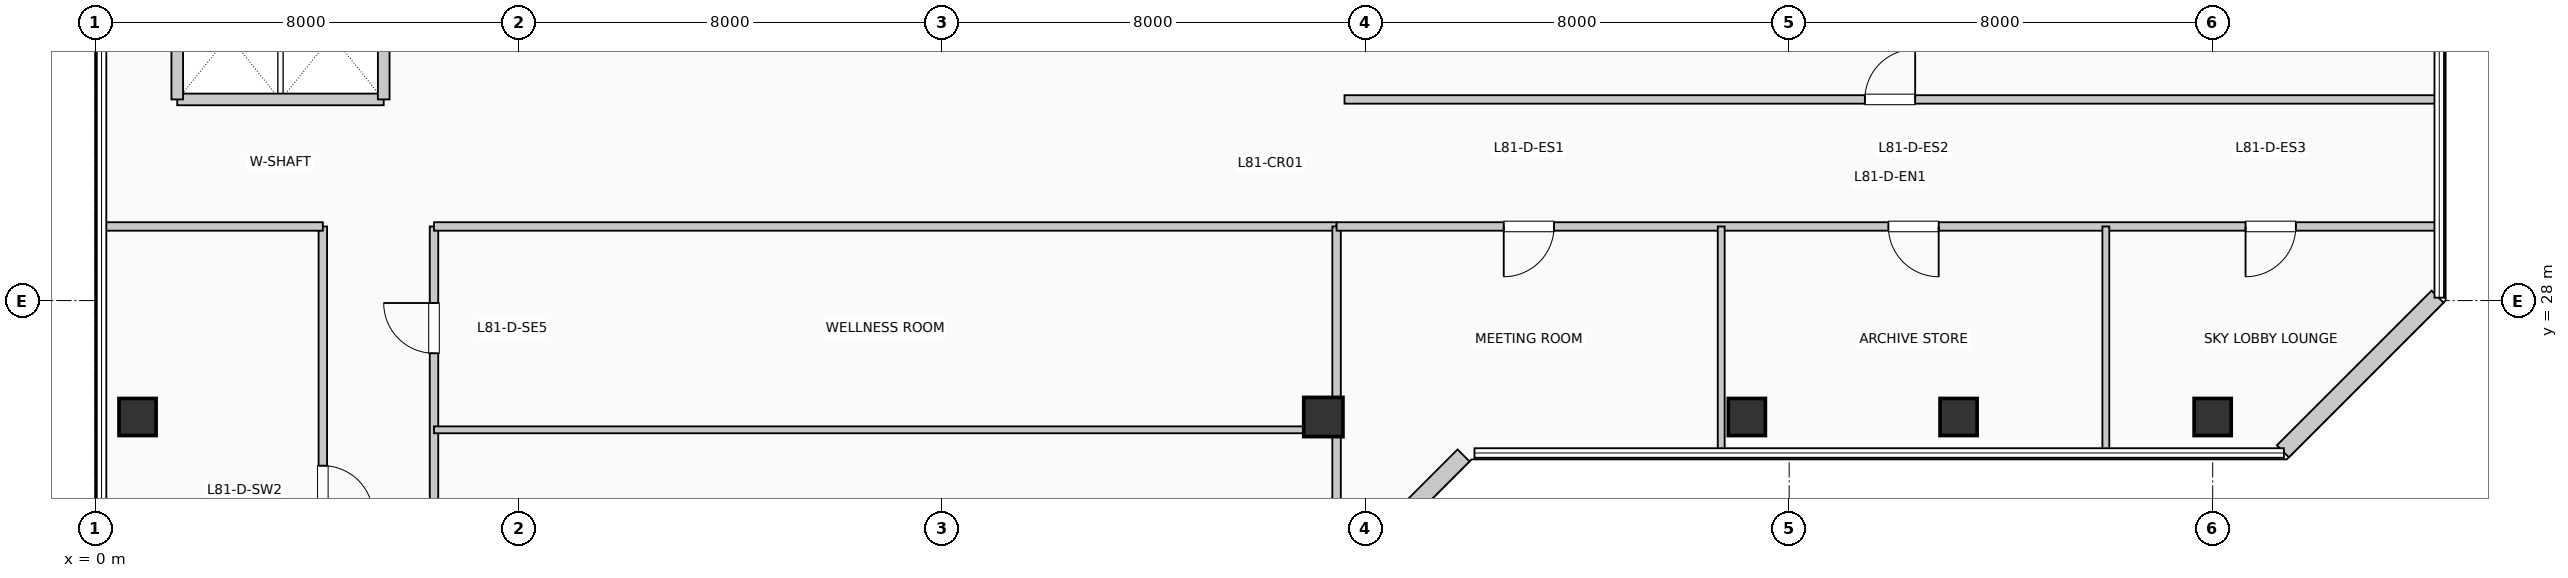
"""IFC4 building model, lengths in metres.
Left out: names, types, materials, properties, quantities, classifications, styles, units other than length and angle.
Written with IfcOpenShell. Run it as: python <this file> out.ifc"""

import sys

from ifc_helpers import new_model, si_unit, direction, frame, frame_2d, origin, origin_2d, place, context, subcontext, project, spatial, rectangle, extrude, element, fill, save


model = new_model("IFC4")
c1 = context("Model", 3, precision=1e-05, world=origin(), true_north=direction((0.0, 1.0)))
c2 = subcontext(c1, "Body", "Model", "MODEL_VIEW")
j1 = project(units=[si_unit("LENGTHUNIT", "METRE"), si_unit("PLANEANGLEUNIT", "RADIAN")], contexts=[c1])
p1 = place(None, origin())
s1 = spatial("IfcSite", under=j1, at=p1, CompositionType="ELEMENT")
p2 = place(p1, origin())
s2 = spatial("IfcBuilding", under=s1, at=p2, CompositionType="ELEMENT")
p3 = place(p2, frame((0.0, 0.0, 331.65)))
s3 = spatial("IfcBuildingStorey", under=s2, at=p3, CompositionType="ELEMENT", Elevation=331.65)
p4 = place(p3, frame((0.8, 25.8, 0.0), z_axis=(0.0, 0.0, 1.0), x_axis=(1.0, 0.0, 0.0)))
e1 = element("IfcColumn", 1, at=p4, inside=s3, PredefinedType="COLUMN", context=c2, shape_type="SweptSolid", body=[
    extrude(rectangle(XDim=0.7, YDim=0.7, at=origin_2d()), origin(), (0.0, 0.0, 1.0), 3.96),
])
p5 = place(p3, frame((23.2, 25.8, 0.0), z_axis=(0.0, 0.0, 1.0), x_axis=(1.0, 0.0, 0.0)))
e2 = element("IfcColumn", 2, at=p5, inside=s3, PredefinedType="COLUMN", context=c2, shape_type="SweptSolid", body=[
    extrude(rectangle(XDim=0.74, YDim=0.74, at=origin_2d()), origin(), (0.0, 0.0, 1.0), 3.96),
])
for number, where, z_axis, x_axis in (
    (3, (31.2, 25.8, 0.0), (0.0, 0.0, 1.0), (1.0, 0.0, 0.0)),
    (4, (35.2, 25.8, 0.0), (0.0, 0.0, 1.0), (1.0, 0.0, 0.0)),
    (5, (40.0, 25.8, 0.0), (0.0, 0.0, 1.0), (1.0, 0.0, 0.0)),
):
    element("IfcColumn", number, at=place(p3, frame(where, z_axis=z_axis, x_axis=x_axis)), inside=s3, PredefinedType="COLUMN", context=c2, shape_type="SweptSolid", body=[
        extrude(rectangle(XDim=0.7, YDim=0.7, at=origin_2d()), origin(), (0.0, 0.0, 1.0), 3.96),
    ])
p6 = place(p3, frame((23.926, 23.152, 0.0), z_axis=(0.0, 0.0, 1.0), x_axis=(0.707106781187, 0.707106781187, 0.0)))
e6 = element("IfcWall", 6, at=p6, inside=s3, PredefinedType="SOLIDWALL", context=c2, shape_type="SweptSolid", body=[
    extrude(rectangle(XDim=2.718, YDim=0.32, at=frame_2d((1.359, 0.0))), origin(), (0.0, 0.0, 1.0), 3.74),
])
p7 = place(p3, frame((41.326, 25.152, 0.0), z_axis=(0.0, 0.0, 1.0), x_axis=(0.707136318428, 0.707077242712, 0.0)))
e7 = element("IfcWall", 7, at=p7, inside=s3, PredefinedType="SOLIDWALL", context=c2, shape_type="SweptSolid", body=[
    extrude(rectangle(XDim=4.133, YDim=0.32, at=frame_2d((2.066, 0.0))), origin(), (0.0, 0.0, 1.0), 3.74),
])
p8 = place(p3, frame((1.55, 31.8, 0.0), z_axis=(0.0, 0.0, 1.0), x_axis=(1.0, 0.0, 0.0)))
e8 = element("IfcWall", 8, at=p8, inside=s3, PredefinedType="PARTITIONING", context=c2, shape_type="SweptSolid", body=[
    extrude(rectangle(XDim=3.9, YDim=0.22, at=frame_2d((1.95, 0.0))), origin(), (0.0, 0.0, 1.0), 3.74),
])
for number, where, z_axis, x_axis in (
    (9, (1.55, 31.8, 0.0), (0.0, 0.0, 1.0), (0.0, 1.0, 0.0)),
    (10, (5.45, 31.8, 0.0), (0.0, 0.0, 1.0), (0.0, 1.0, 0.0)),
):
    element("IfcWall", number, at=place(p3, frame(where, z_axis=z_axis, x_axis=x_axis)), inside=s3, PredefinedType="PARTITIONING", context=c2, shape_type="SweptSolid", body=[
        extrude(rectangle(XDim=2.38, YDim=0.22, at=frame_2d((1.19, 0.0))), origin(), (0.0, 0.0, 1.0), 3.74),
    ])
p9 = place(p3, frame((4.3, 10.19, 0.0), z_axis=(0.0, 0.0, 1.0), x_axis=(0.0, 1.0, 0.0)))
e11 = element("IfcWall", 11, at=p9, inside=s3, PredefinedType="PARTITIONING", context=c2, shape_type="SweptSolid", body=[
    extrude(rectangle(XDim=19.21, YDim=0.16, at=frame_2d((9.605, 0.0))), origin(), (0.0, 0.0, 1.0), 3.74),
])
p10 = place(p9, frame((5.085, 0.0, 0.0), z_axis=(0.0, 0.0, 1.0), x_axis=(-1.0, 0.0, 0.0)))
e12 = element("IfcOpeningElement", 12, at=p10, cuts=e11, PredefinedType="OPENING", context=c2, shape_type="SweptSolid", body=[
    extrude(rectangle(XDim=0.95, YDim=2.15, at=frame_2d((0.475, 1.075))), frame((0.0, 0.09, 0.0), z_axis=(0.0, -1.0, 0.0), x_axis=(1.0, 0.0, 0.0)), (0.0, 0.0, 1.0), 0.18),
])
p11 = place(p9, frame((14.69, 0.0, 0.0), z_axis=(0.0, 0.0, 1.0), x_axis=(-1.0, 0.0, 0.0)))
e13 = element("IfcOpeningElement", 13, at=p11, cuts=e11, PredefinedType="OPENING", context=c2, shape_type="SweptSolid", body=[
    extrude(rectangle(XDim=0.95, YDim=2.15, at=frame_2d((0.475, 1.075))), frame((0.0, 0.09, 0.0), z_axis=(0.0, -1.0, 0.0), x_axis=(1.0, 0.0, 0.0)), (0.0, 0.0, 1.0), 0.18),
])
p12 = place(p3, frame((6.4, 10.19, 0.0), z_axis=(0.0, 0.0, 1.0), x_axis=(0.0, 1.0, 0.0)))
e14 = element("IfcWall", 14, at=p12, inside=s3, PredefinedType="PARTITIONING", context=c2, shape_type="SweptSolid", body=[
    extrude(rectangle(XDim=19.21, YDim=0.16, at=frame_2d((9.605, 0.0))), origin(), (0.0, 0.0, 1.0), 3.74),
])
p13 = place(p12, frame((1.35, 0.0, 0.0)))
e15 = element("IfcOpeningElement", 15, at=p13, cuts=e14, PredefinedType="OPENING", context=c2, shape_type="SweptSolid", body=[
    extrude(rectangle(XDim=0.95, YDim=2.15, at=frame_2d((0.475, 1.075))), frame((0.0, 0.09, 0.0), z_axis=(0.0, -1.0, 0.0), x_axis=(1.0, 0.0, 0.0)), (0.0, 0.0, 1.0), 0.18),
])
p14 = place(p12, frame((5.096, 0.0, 0.0)))
e16 = element("IfcOpeningElement", 16, at=p14, cuts=e14, PredefinedType="OPENING", context=c2, shape_type="SweptSolid", body=[
    extrude(rectangle(XDim=0.95, YDim=2.15, at=frame_2d((0.475, 1.075))), frame((0.0, 0.09, 0.0), z_axis=(0.0, -1.0, 0.0), x_axis=(1.0, 0.0, 0.0)), (0.0, 0.0, 1.0), 0.18),
])
p15 = place(p12, frame((9.034, 0.0, 0.0)))
e17 = element("IfcOpeningElement", 17, at=p15, cuts=e14, PredefinedType="OPENING", context=c2, shape_type="SweptSolid", body=[
    extrude(rectangle(XDim=0.95, YDim=2.15, at=frame_2d((0.475, 1.075))), frame((0.0, 0.09, 0.0), z_axis=(0.0, -1.0, 0.0), x_axis=(1.0, 0.0, 0.0)), (0.0, 0.0, 1.0), 0.18),
])
p16 = place(p12, frame((12.972, 0.0, 0.0)))
e18 = element("IfcOpeningElement", 18, at=p16, cuts=e14, PredefinedType="OPENING", context=c2, shape_type="SweptSolid", body=[
    extrude(rectangle(XDim=0.95, YDim=2.15, at=frame_2d((0.475, 1.075))), frame((0.0, 0.09, 0.0), z_axis=(0.0, -1.0, 0.0), x_axis=(1.0, 0.0, 0.0)), (0.0, 0.0, 1.0), 0.18),
])
p17 = place(p12, frame((16.814, 0.0, 0.0)))
e19 = element("IfcOpeningElement", 19, at=p17, cuts=e14, PredefinedType="OPENING", context=c2, shape_type="SweptSolid", body=[
    extrude(rectangle(XDim=0.95, YDim=2.15, at=frame_2d((0.475, 1.075))), frame((0.0, 0.09, 0.0), z_axis=(0.0, -1.0, 0.0), x_axis=(1.0, 0.0, 0.0)), (0.0, 0.0, 1.0), 0.18),
])
p18 = place(p3, frame((0.19, 29.4, 0.0), z_axis=(0.0, 0.0, 1.0), x_axis=(1.0, 0.0, 0.0)))
e20 = element("IfcWall", 20, at=p18, inside=s3, PredefinedType="PARTITIONING", context=c2, shape_type="SweptSolid", body=[
    extrude(rectangle(XDim=4.11, YDim=0.16, at=frame_2d((2.055, 0.0))), origin(), (0.0, 0.0, 1.0), 3.425),
])
p19 = place(p3, frame((6.4, 29.4, 0.0), z_axis=(0.0, 0.0, 1.0), x_axis=(1.0, 0.0, 0.0)))
e21 = element("IfcWall", 21, at=p19, inside=s3, PredefinedType="PARTITIONING", context=c2, shape_type="SweptSolid", body=[
    extrude(rectangle(XDim=17.05, YDim=0.16, at=frame_2d((8.525, 0.0))), origin(), (0.0, 0.0, 1.0), 3.425),
])
p20 = place(p3, frame((23.45, 5.99, 0.0), z_axis=(0.0, 0.0, 1.0), x_axis=(0.0, 1.0, 0.0)))
e22 = element("IfcWall", 22, at=p20, inside=s3, PredefinedType="PARTITIONING", context=c2, shape_type="SweptSolid", body=[
    extrude(rectangle(XDim=23.41, YDim=0.16, at=frame_2d((11.705, 0.0))), origin(), (0.0, 0.0, 1.0), 3.175),
])
p21 = place(p3, frame((6.4, 25.558, 0.0), z_axis=(0.0, 0.0, 1.0), x_axis=(1.0, 0.0, 0.0)))
e23 = element("IfcWall", 23, at=p21, inside=s3, PredefinedType="PARTITIONING", context=c2, shape_type="SweptSolid", body=[
    extrude(rectangle(XDim=17.05, YDim=0.13, at=frame_2d((8.525, 0.0))), origin(), (0.0, 0.0, 1.0), 3.175),
])
p22 = place(p3, frame((23.45, 29.4, 0.0), z_axis=(0.0, 0.0, 1.0), x_axis=(1.0, 0.0, 0.0)))
e24 = element("IfcWall", 24, at=p22, inside=s3, PredefinedType="PARTITIONING", context=c2, shape_type="SweptSolid", body=[
    extrude(rectangle(XDim=20.76, YDim=0.16, at=frame_2d((10.38, 0.0))), origin(), (0.0, 0.0, 1.0), 3.425),
])
p23 = place(p22, frame((4.108, 0.0, 0.0), z_axis=(0.0, 0.0, 1.0), x_axis=(-1.0, 0.0, 0.0)))
e25 = element("IfcOpeningElement", 25, at=p23, cuts=e24, PredefinedType="OPENING", context=c2, shape_type="SweptSolid", body=[
    extrude(rectangle(XDim=0.95, YDim=2.15, at=frame_2d((0.475, 1.075))), frame((0.0, 0.09, 0.0), z_axis=(0.0, -1.0, 0.0), x_axis=(1.0, 0.0, 0.0)), (0.0, 0.0, 1.0), 0.18),
])
p24 = place(p22, frame((11.374, 0.0, 0.0), z_axis=(0.0, 0.0, 1.0), x_axis=(-1.0, 0.0, 0.0)))
e26 = element("IfcOpeningElement", 26, at=p24, cuts=e24, PredefinedType="OPENING", context=c2, shape_type="SweptSolid", body=[
    extrude(rectangle(XDim=0.95, YDim=2.15, at=frame_2d((0.475, 1.075))), frame((0.0, 0.09, 0.0), z_axis=(0.0, -1.0, 0.0), x_axis=(1.0, 0.0, 0.0)), (0.0, 0.0, 1.0), 0.18),
])
p25 = place(p22, frame((18.121, 0.0, 0.0), z_axis=(0.0, 0.0, 1.0), x_axis=(-1.0, 0.0, 0.0)))
e27 = element("IfcOpeningElement", 27, at=p25, cuts=e24, PredefinedType="OPENING", context=c2, shape_type="SweptSolid", body=[
    extrude(rectangle(XDim=0.95, YDim=2.15, at=frame_2d((0.475, 1.075))), frame((0.0, 0.09, 0.0), z_axis=(0.0, -1.0, 0.0), x_axis=(1.0, 0.0, 0.0)), (0.0, 0.0, 1.0), 0.18),
])
p26 = place(p3, frame((23.6, 31.8, 0.0), z_axis=(0.0, 0.0, 1.0), x_axis=(1.0, 0.0, 0.0)))
e28 = element("IfcWall", 28, at=p26, inside=s3, PredefinedType="PARTITIONING", context=c2, shape_type="SweptSolid", body=[
    extrude(rectangle(XDim=20.61, YDim=0.16, at=frame_2d((10.305, 0.0))), origin(), (0.0, 0.0, 1.0), 3.74),
])
p27 = place(p26, frame((9.83, 0.0, 0.0)))
e29 = element("IfcOpeningElement", 29, at=p27, cuts=e28, PredefinedType="OPENING", context=c2, shape_type="SweptSolid", body=[
    extrude(rectangle(XDim=0.95, YDim=2.15, at=frame_2d((0.475, 1.075))), frame((0.0, 0.09, 0.0), z_axis=(0.0, -1.0, 0.0), x_axis=(1.0, 0.0, 0.0)), (0.0, 0.0, 1.0), 0.18),
])
for number, where, z_axis, x_axis in (
    (30, (30.716, 25.19, 0.0), (0.0, 0.0, 1.0), (0.0, 1.0, 0.0)),
    (31, (37.982, 25.19, 0.0), (0.0, 0.0, 1.0), (0.0, 1.0, 0.0)),
):
    element("IfcWall", number, at=place(p3, frame(where, z_axis=z_axis, x_axis=x_axis)), inside=s3, PredefinedType="PARTITIONING", context=c2, shape_type="SweptSolid", body=[
        extrude(rectangle(XDim=4.21, YDim=0.13, at=frame_2d((2.105, 0.0))), origin(), (0.0, 0.0, 1.0), 3.74),
    ])
p28 = place(p11, origin())
e32 = element("IfcDoor", 32, at=p28, inside=s3, OperationType="SINGLE_SWING_LEFT", PredefinedType="DOOR", context=c2, shape_type="SweptSolid", body=[
    extrude(rectangle(XDim=0.95, YDim=2.15, at=frame_2d((0.475, 1.075))), frame((0.0, 0.025, 0.0), z_axis=(0.0, -1.0, 0.0), x_axis=(1.0, 0.0, 0.0)), (0.0, 0.0, 1.0), 0.05),
])
fill(e13, e32)
p29 = place(p17, origin())
e33 = element("IfcDoor", 33, at=p29, inside=s3, OperationType="SINGLE_SWING_RIGHT", PredefinedType="DOOR", context=c2, shape_type="SweptSolid", body=[
    extrude(rectangle(XDim=0.95, YDim=2.15, at=frame_2d((0.475, 1.075))), frame((0.0, 0.025, 0.0), z_axis=(0.0, -1.0, 0.0), x_axis=(1.0, 0.0, 0.0)), (0.0, 0.0, 1.0), 0.05),
])
fill(e19, e33)
p30 = place(p23, origin())
e34 = element("IfcDoor", 34, at=p30, inside=s3, OperationType="SINGLE_SWING_LEFT", PredefinedType="DOOR", context=c2, shape_type="SweptSolid", body=[
    extrude(rectangle(XDim=0.95, YDim=2.15, at=frame_2d((0.475, 1.075))), frame((0.0, 0.025, 0.0), z_axis=(0.0, -1.0, 0.0), x_axis=(1.0, 0.0, 0.0)), (0.0, 0.0, 1.0), 0.05),
])
fill(e25, e34)
p31 = place(p24, origin())
e35 = element("IfcDoor", 35, at=p31, inside=s3, OperationType="SINGLE_SWING_RIGHT", PredefinedType="DOOR", context=c2, shape_type="SweptSolid", body=[
    extrude(rectangle(XDim=0.95, YDim=2.15, at=frame_2d((0.475, 1.075))), frame((0.0, 0.025, 0.0), z_axis=(0.0, -1.0, 0.0), x_axis=(1.0, 0.0, 0.0)), (0.0, 0.0, 1.0), 0.05),
])
fill(e26, e35)
p32 = place(p25, origin())
e36 = element("IfcDoor", 36, at=p32, inside=s3, OperationType="SINGLE_SWING_LEFT", PredefinedType="DOOR", context=c2, shape_type="SweptSolid", body=[
    extrude(rectangle(XDim=0.95, YDim=2.15, at=frame_2d((0.475, 1.075))), frame((0.0, 0.025, 0.0), z_axis=(0.0, -1.0, 0.0), x_axis=(1.0, 0.0, 0.0)), (0.0, 0.0, 1.0), 0.05),
])
fill(e27, e36)
p33 = place(p27, origin())
e37 = element("IfcDoor", 37, at=p33, inside=s3, OperationType="SINGLE_SWING_RIGHT", PredefinedType="DOOR", context=c2, shape_type="SweptSolid", body=[
    extrude(rectangle(XDim=0.95, YDim=2.15, at=frame_2d((0.475, 1.075))), frame((0.0, 0.025, 0.0), z_axis=(0.0, -1.0, 0.0), x_axis=(1.0, 0.0, 0.0)), (0.0, 0.0, 1.0), 0.05),
])
fill(e29, e37)
save(model, sys.argv[1])
